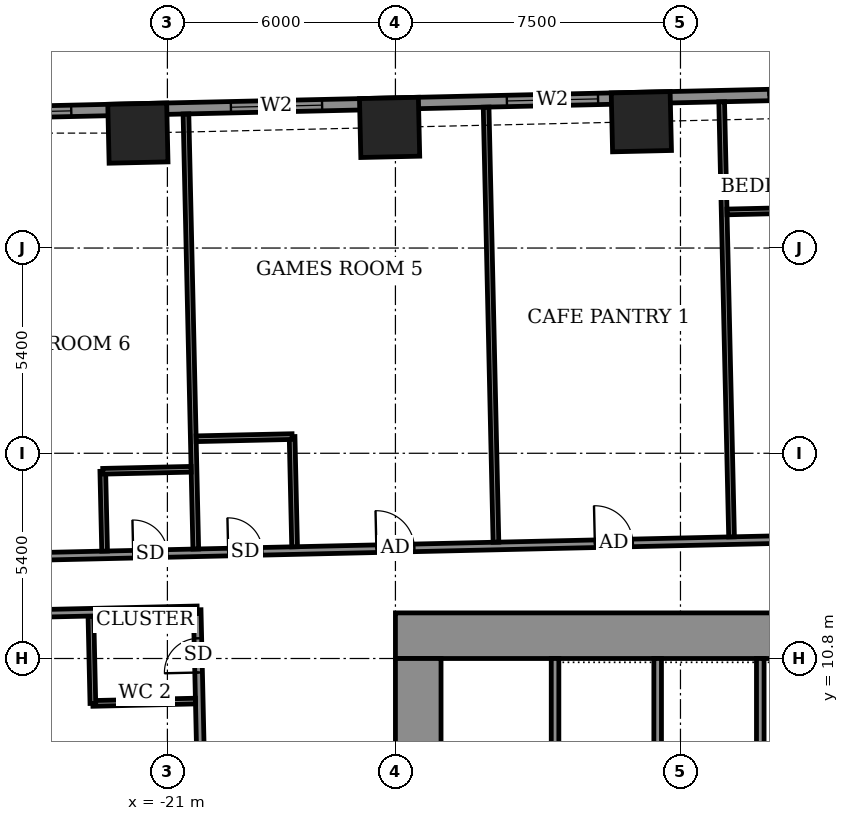
"""IFC4 building model, lengths in metres.
Left out: names, types, materials, properties, quantities, classifications, styles, units other than length and angle.
Written with IfcOpenShell. Run it as: python <this file> out.ifc"""

import sys

from ifc_helpers import new_model, si_unit, direction, frame, frame_2d, origin, origin_2d, place, context, subcontext, project, spatial, rectangle, extrude, element, fill, save


model = new_model("IFC4")
c1 = context("Model", 3, precision=1e-05, world=origin(), true_north=direction((0.0, 1.0)))
c2 = subcontext(c1, "Body", "Model", "MODEL_VIEW")
j1 = project(units=[si_unit("LENGTHUNIT", "METRE"), si_unit("PLANEANGLEUNIT", "RADIAN")], contexts=[c1])
p1 = place(None, origin())
s1 = spatial("IfcSite", under=j1, at=p1, CompositionType="ELEMENT")
p2 = place(p1, origin())
s2 = spatial("IfcBuilding", under=s1, at=p2, CompositionType="ELEMENT")
p3 = place(p2, frame((0.0, 0.0, 29.5)))
s3 = spatial("IfcBuildingStorey", under=s2, at=p3, CompositionType="ELEMENT", Elevation=29.5)
for number, where, z_axis, x_axis in (
    (1, (-8.529, 24.924, -0.55), (0.0, 0.0, 1.0), (-1.0, -0.023, 0.0)),
    (2, (-15.154, 24.774, -0.55), (0.0, 0.0, 1.0), (-1.0, -0.023, 0.0)),
    (3, (-21.776, 24.624, -0.55), (0.0, 0.0, 1.0), (-1.0, -0.023, 0.0)),
):
    element("IfcColumn", number, at=place(p3, frame(where, z_axis=z_axis, x_axis=x_axis)), inside=s3, PredefinedType="COLUMN", context=c2, shape_type="SweptSolid", body=[
        extrude(rectangle(XDim=1.55, YDim=1.55, at=origin_2d()), origin(), (0.0, 0.0, 1.0), 4.6),
    ])
p4 = place(p3, frame((24.423, 26.298, 0.0), z_axis=(0.0, 0.0, 1.0), x_axis=(-0.999742433108, -0.022695097355, 0.0)))
e4 = element("IfcWall", 4, at=p4, inside=s3, PredefinedType="SOLIDWALL", context=c2, shape_type="SweptSolid", body=[
    extrude(rectangle(XDim=52.701, YDim=0.3, at=frame_2d((26.35, 0.0))), origin(), (0.0, 0.0, 1.0), 4.05),
])
p5 = place(p4, frame((2.757, 0.0, 0.0)))
e5 = element("IfcOpeningElement", 5, at=p5, cuts=e4, PredefinedType="OPENING", context=c2, shape_type="SweptSolid", body=[
    extrude(rectangle(XDim=1.5, YDim=2.4, at=frame_2d((0.75, 1.2))), frame((0.0, 0.16, 0.0), z_axis=(0.0, -1.0, 0.0), x_axis=(1.0, 0.0, 0.0)), (0.0, 0.0, 1.0), 0.32),
])
p6 = place(p4, frame((8.937, 0.0, 0.9)))
e6 = element("IfcOpeningElement", 6, at=p6, cuts=e4, PredefinedType="OPENING", context=c2, shape_type="SweptSolid", body=[
    extrude(rectangle(XDim=2.4, YDim=1.5, at=frame_2d((1.2, 0.75))), frame((0.0, 0.16, 0.0), z_axis=(0.0, -1.0, 0.0), x_axis=(1.0, 0.0, 0.0)), (0.0, 0.0, 1.0), 0.32),
])
p7 = place(p4, frame((16.675, 0.0, 0.0)))
e7 = element("IfcOpeningElement", 7, at=p7, cuts=e4, PredefinedType="OPENING", context=c2, shape_type="SweptSolid", body=[
    extrude(rectangle(XDim=1.5, YDim=2.4, at=frame_2d((0.75, 1.2))), frame((0.0, 0.16, 0.0), z_axis=(0.0, -1.0, 0.0), x_axis=(1.0, 0.0, 0.0)), (0.0, 0.0, 1.0), 0.32),
])
p8 = place(p4, frame((22.5, 0.0, 0.0)))
e8 = element("IfcOpeningElement", 8, at=p8, cuts=e4, PredefinedType="OPENING", context=c2, shape_type="SweptSolid", body=[
    extrude(rectangle(XDim=1.5, YDim=2.4, at=frame_2d((0.75, 1.2))), frame((0.0, 0.16, 0.0), z_axis=(0.0, -1.0, 0.0), x_axis=(1.0, 0.0, 0.0)), (0.0, 0.0, 1.0), 0.32),
])
p9 = place(p4, frame((28.113, 0.0, 0.0)))
e9 = element("IfcOpeningElement", 9, at=p9, cuts=e4, PredefinedType="OPENING", context=c2, shape_type="SweptSolid", body=[
    extrude(rectangle(XDim=1.5, YDim=2.4, at=frame_2d((0.75, 1.2))), frame((0.0, 0.16, 0.0), z_axis=(0.0, -1.0, 0.0), x_axis=(1.0, 0.0, 0.0)), (0.0, 0.0, 1.0), 0.32),
])
p10 = place(p4, frame((34.1, 0.0, 0.9)))
e10 = element("IfcOpeningElement", 10, at=p10, cuts=e4, PredefinedType="OPENING", context=c2, shape_type="SweptSolid", body=[
    extrude(rectangle(XDim=2.4, YDim=1.5, at=frame_2d((1.2, 0.75))), frame((0.0, 0.16, 0.0), z_axis=(0.0, -1.0, 0.0), x_axis=(1.0, 0.0, 0.0)), (0.0, 0.0, 1.0), 0.32),
])
p11 = place(p4, frame((41.363, 0.0, 0.9)))
e11 = element("IfcOpeningElement", 11, at=p11, cuts=e4, PredefinedType="OPENING", context=c2, shape_type="SweptSolid", body=[
    extrude(rectangle(XDim=2.4, YDim=1.5, at=frame_2d((1.2, 0.75))), frame((0.0, 0.16, 0.0), z_axis=(0.0, -1.0, 0.0), x_axis=(1.0, 0.0, 0.0)), (0.0, 0.0, 1.0), 0.32),
])
p12 = place(p4, frame((47.965, 0.0, 0.9)))
e12 = element("IfcOpeningElement", 12, at=p12, cuts=e4, PredefinedType="OPENING", context=c2, shape_type="SweptSolid", body=[
    extrude(rectangle(XDim=2.4, YDim=1.5, at=frame_2d((1.2, 0.75))), frame((0.0, 0.16, 0.0), z_axis=(0.0, -1.0, 0.0), x_axis=(1.0, 0.0, 0.0)), (0.0, 0.0, 1.0), 0.32),
])
p13 = place(p3, frame((-17.249, 26.802, 0.0), z_axis=(0.0, 0.0, 1.0), x_axis=(0.999743094499, 0.022665943652, 0.0)))
e13 = element("IfcWall", 13, at=p13, inside=s3, PredefinedType="USERDEFINED", context=c2, shape_type="SweptSolid", body=[
    extrude(rectangle(XDim=6.0, YDim=0.55, at=frame_2d((3.0, 0.0))), origin(), (0.0, 0.0, 1.0), 0.8),
])
p14 = place(p3, frame((-19.589, -15.562, 0.0), z_axis=(0.0, 0.0, 1.0), x_axis=(-0.02267447203, 0.999742901109, 0.0)))
e14 = element("IfcWall", 14, at=p14, inside=s3, PredefinedType="PARTITIONING", context=c2, shape_type="SweptSolid", body=[
    extrude(rectangle(XDim=27.65, YDim=0.2, at=frame_2d((13.825, 0.0))), origin(), (0.0, 0.0, 1.0), 4.05),
])
p15 = place(p14, frame((22.313, 0.0, 0.0)))
e15 = element("IfcOpeningElement", 15, at=p15, cuts=e14, PredefinedType="OPENING", context=c2, shape_type="SweptSolid", body=[
    extrude(rectangle(XDim=1.0, YDim=2.1, at=frame_2d((0.5, 1.05))), frame((0.0, 0.11, 0.0), z_axis=(0.0, -1.0, 0.0), x_axis=(1.0, 0.0, 0.0)), (0.0, 0.0, 1.0), 0.22),
])
p16 = place(p14, frame((26.0, 0.0, 0.0)))
e16 = element("IfcOpeningElement", 16, at=p16, cuts=e14, PredefinedType="OPENING", context=c2, shape_type="SweptSolid", body=[
    extrude(rectangle(XDim=0.9, YDim=2.1, at=frame_2d((0.45, 1.05))), frame((0.0, 0.11, 0.0), z_axis=(0.0, -1.0, 0.0), x_axis=(1.0, 0.0, 0.0)), (0.0, 0.0, 1.0), 0.22),
])
p17 = place(p14, frame((17.817, 0.0, 0.0)))
e17 = element("IfcOpeningElement", 17, at=p17, cuts=e14, PredefinedType="OPENING", context=c2, shape_type="SweptSolid", body=[
    extrude(rectangle(XDim=1.0, YDim=2.1, at=frame_2d((0.5, 1.05))), frame((0.0, 0.11, 0.0), z_axis=(0.0, -1.0, 0.0), x_axis=(1.0, 0.0, 0.0)), (0.0, 0.0, 1.0), 0.22),
])
p18 = place(p14, frame((12.1, 0.0, 0.0)))
e18 = element("IfcOpeningElement", 18, at=p18, cuts=e14, PredefinedType="OPENING", context=c2, shape_type="SweptSolid", body=[
    extrude(rectangle(XDim=1.0, YDim=2.1, at=frame_2d((0.5, 1.05))), frame((0.0, 0.11, 0.0), z_axis=(0.0, -1.0, 0.0), x_axis=(1.0, 0.0, 0.0)), (0.0, 0.0, 1.0), 0.22),
])
p19 = place(p14, frame((14.625, 0.0, 0.0)))
e19 = element("IfcOpeningElement", 19, at=p19, cuts=e14, PredefinedType="OPENING", context=c2, shape_type="SweptSolid", body=[
    extrude(rectangle(XDim=0.9, YDim=2.1, at=frame_2d((0.45, 1.05))), frame((0.0, 0.11, 0.0), z_axis=(0.0, -1.0, 0.0), x_axis=(1.0, 0.0, 0.0)), (0.0, 0.0, 1.0), 0.22),
])
p20 = place(p14, frame((9.825, 0.0, 0.0)))
e20 = element("IfcOpeningElement", 20, at=p20, cuts=e14, PredefinedType="OPENING", context=c2, shape_type="SweptSolid", body=[
    extrude(rectangle(XDim=1.0, YDim=2.1, at=frame_2d((0.5, 1.05))), frame((0.0, 0.11, 0.0), z_axis=(0.0, -1.0, 0.0), x_axis=(1.0, 0.0, 0.0)), (0.0, 0.0, 1.0), 0.22),
])
p21 = place(p14, frame((7.475, 0.0, 0.0)))
e21 = element("IfcOpeningElement", 21, at=p21, cuts=e14, PredefinedType="OPENING", context=c2, shape_type="SweptSolid", body=[
    extrude(rectangle(XDim=0.9, YDim=2.1, at=frame_2d((0.45, 1.05))), frame((0.0, 0.11, 0.0), z_axis=(0.0, -1.0, 0.0), x_axis=(1.0, 0.0, 0.0)), (0.0, 0.0, 1.0), 0.22),
])
p22 = place(p14, frame((1.612, 0.0, 0.0)))
e22 = element("IfcOpeningElement", 22, at=p22, cuts=e14, PredefinedType="OPENING", context=c2, shape_type="SweptSolid", body=[
    extrude(rectangle(XDim=1.0, YDim=2.1, at=frame_2d((0.5, 1.05))), frame((0.0, 0.11, 0.0), z_axis=(0.0, -1.0, 0.0), x_axis=(1.0, 0.0, 0.0)), (0.0, 0.0, 1.0), 0.22),
])
p23 = place(p14, frame((4.975, 0.0, 0.0)))
e23 = element("IfcOpeningElement", 23, at=p23, cuts=e14, PredefinedType="OPENING", context=c2, shape_type="SweptSolid", body=[
    extrude(rectangle(XDim=0.9, YDim=2.1, at=frame_2d((0.45, 1.05))), frame((0.0, 0.11, 0.0), z_axis=(0.0, -1.0, 0.0), x_axis=(1.0, 0.0, 0.0)), (0.0, 0.0, 1.0), 0.22),
])
p24 = place(p3, frame((-22.961, 9.618, 0.0), z_axis=(0.0, 0.0, 1.0), x_axis=(0.999736155505, 0.022969966847, 0.0)))
e24 = element("IfcWall", 24, at=p24, inside=s3, PredefinedType="PARTITIONING", context=c2, shape_type="SweptSolid", body=[
    extrude(rectangle(XDim=2.7, YDim=0.15, at=frame_2d((1.35, 0.0))), origin(), (0.0, 0.0, 1.0), 4.05),
])
p25 = place(p3, frame((-22.961, 9.618, 0.0), z_axis=(0.0, 0.0, 1.0), x_axis=(-0.022603288534, 0.999744513037, 0.0)))
e25 = element("IfcWall", 25, at=p25, inside=s3, PredefinedType="PARTITIONING", context=c2, shape_type="SweptSolid", body=[
    extrude(rectangle(XDim=2.301, YDim=0.15, at=frame_2d((1.15, 0.0))), origin(), (0.0, 0.0, 1.0), 4.05),
])
p26 = place(p3, frame((-31.313, 11.829, 0.0), z_axis=(0.0, 0.0, 1.0), x_axis=(0.999742346277, 0.022698921993, 0.0)))
e26 = element("IfcWall", 26, at=p26, inside=s3, PredefinedType="PARTITIONING", context=c2, shape_type="SweptSolid", body=[
    extrude(rectangle(XDim=11.1, YDim=0.2, at=frame_2d((5.55, 0.0))), origin(), (0.0, 0.0, 1.0), 4.05),
])
p27 = place(p3, frame((-31.347, 13.329, 0.0), z_axis=(0.0, 0.0, 1.0), x_axis=(0.999742613079, 0.022687168058, 0.0)))
e27 = element("IfcWall", 27, at=p27, inside=s3, PredefinedType="PARTITIONING", context=c2, shape_type="SweptSolid", body=[
    extrude(rectangle(XDim=58.799, YDim=0.2, at=frame_2d((29.399, 0.0))), origin(), (0.0, 0.0, 1.0), 4.05),
])
p28 = place(p27, frame((55.05, 0.0, 0.0)))
e28 = element("IfcOpeningElement", 28, at=p28, cuts=e27, PredefinedType="OPENING", context=c2, shape_type="SweptSolid", body=[
    extrude(rectangle(XDim=1.0, YDim=2.1, at=frame_2d((0.5, 1.05))), frame((0.0, 0.11, 0.0), z_axis=(0.0, -1.0, 0.0), x_axis=(1.0, 0.0, 0.0)), (0.0, 0.0, 1.0), 0.22),
])
p29 = place(p27, frame((49.15, 0.0, 0.0)))
e29 = element("IfcOpeningElement", 29, at=p29, cuts=e27, PredefinedType="OPENING", context=c2, shape_type="SweptSolid", body=[
    extrude(rectangle(XDim=0.9, YDim=2.1, at=frame_2d((0.45, 1.05))), frame((0.0, 0.11, 0.0), z_axis=(0.0, -1.0, 0.0), x_axis=(1.0, 0.0, 0.0)), (0.0, 0.0, 1.0), 0.22),
])
p30 = place(p27, frame((42.55, 0.0, 0.0)))
e30 = element("IfcOpeningElement", 30, at=p30, cuts=e27, PredefinedType="OPENING", context=c2, shape_type="SweptSolid", body=[
    extrude(rectangle(XDim=1.0, YDim=2.1, at=frame_2d((0.5, 1.05))), frame((0.0, 0.11, 0.0), z_axis=(0.0, -1.0, 0.0), x_axis=(1.0, 0.0, 0.0)), (0.0, 0.0, 1.0), 0.22),
])
p31 = place(p27, frame((46.55, 0.0, 0.0)))
e31 = element("IfcOpeningElement", 31, at=p31, cuts=e27, PredefinedType="OPENING", context=c2, shape_type="SweptSolid", body=[
    extrude(rectangle(XDim=0.9, YDim=2.1, at=frame_2d((0.45, 1.05))), frame((0.0, 0.11, 0.0), z_axis=(0.0, -1.0, 0.0), x_axis=(1.0, 0.0, 0.0)), (0.0, 0.0, 1.0), 0.22),
])
p32 = place(p27, frame((38.625, 0.0, 0.0)))
e32 = element("IfcOpeningElement", 32, at=p32, cuts=e27, PredefinedType="OPENING", context=c2, shape_type="SweptSolid", body=[
    extrude(rectangle(XDim=0.9, YDim=2.1, at=frame_2d((0.45, 1.05))), frame((0.0, 0.11, 0.0), z_axis=(0.0, -1.0, 0.0), x_axis=(1.0, 0.0, 0.0)), (0.0, 0.0, 1.0), 0.22),
])
p33 = place(p27, frame((31.15, 0.0, 0.0)))
e33 = element("IfcOpeningElement", 33, at=p33, cuts=e27, PredefinedType="OPENING", context=c2, shape_type="SweptSolid", body=[
    extrude(rectangle(XDim=0.9, YDim=2.1, at=frame_2d((0.45, 1.05))), frame((0.0, 0.11, 0.0), z_axis=(0.0, -1.0, 0.0), x_axis=(1.0, 0.0, 0.0)), (0.0, 0.0, 1.0), 0.22),
])
p34 = place(p27, frame((28.475, 0.0, 0.0)))
e34 = element("IfcOpeningElement", 34, at=p34, cuts=e27, PredefinedType="OPENING", context=c2, shape_type="SweptSolid", body=[
    extrude(rectangle(XDim=0.9, YDim=2.1, at=frame_2d((0.45, 1.05))), frame((0.0, 0.11, 0.0), z_axis=(0.0, -1.0, 0.0), x_axis=(1.0, 0.0, 0.0)), (0.0, 0.0, 1.0), 0.22),
])
p35 = place(p27, frame((21.6, 0.0, 0.0)))
e35 = element("IfcOpeningElement", 35, at=p35, cuts=e27, PredefinedType="OPENING", context=c2, shape_type="SweptSolid", body=[
    extrude(rectangle(XDim=1.0, YDim=2.1, at=frame_2d((0.5, 1.05))), frame((0.0, 0.11, 0.0), z_axis=(0.0, -1.0, 0.0), x_axis=(1.0, 0.0, 0.0)), (0.0, 0.0, 1.0), 0.22),
])
p36 = place(p27, frame((15.85, 0.0, 0.0)))
e36 = element("IfcOpeningElement", 36, at=p36, cuts=e27, PredefinedType="OPENING", context=c2, shape_type="SweptSolid", body=[
    extrude(rectangle(XDim=1.0, YDim=2.1, at=frame_2d((0.5, 1.05))), frame((0.0, 0.11, 0.0), z_axis=(0.0, -1.0, 0.0), x_axis=(1.0, 0.0, 0.0)), (0.0, 0.0, 1.0), 0.22),
])
p37 = place(p27, frame((11.95, 0.0, 0.0)))
e37 = element("IfcOpeningElement", 37, at=p37, cuts=e27, PredefinedType="OPENING", context=c2, shape_type="SweptSolid", body=[
    extrude(rectangle(XDim=0.9, YDim=2.1, at=frame_2d((0.45, 1.05))), frame((0.0, 0.11, 0.0), z_axis=(0.0, -1.0, 0.0), x_axis=(1.0, 0.0, 0.0)), (0.0, 0.0, 1.0), 0.22),
])
p38 = place(p27, frame((3.15, 0.0, 0.0)))
e38 = element("IfcOpeningElement", 38, at=p38, cuts=e27, PredefinedType="OPENING", context=c2, shape_type="SweptSolid", body=[
    extrude(rectangle(XDim=1.0, YDim=2.1, at=frame_2d((0.5, 1.05))), frame((0.0, 0.11, 0.0), z_axis=(0.0, -1.0, 0.0), x_axis=(1.0, 0.0, 0.0)), (0.0, 0.0, 1.0), 0.22),
])
p39 = place(p27, frame((9.45, 0.0, 0.0)))
e39 = element("IfcOpeningElement", 39, at=p39, cuts=e27, PredefinedType="OPENING", context=c2, shape_type="SweptSolid", body=[
    extrude(rectangle(XDim=0.9, YDim=2.1, at=frame_2d((0.45, 1.05))), frame((0.0, 0.11, 0.0), z_axis=(0.0, -1.0, 0.0), x_axis=(1.0, 0.0, 0.0)), (0.0, 0.0, 1.0), 0.22),
])
p40 = place(p3, frame((-22.652, 13.626, 0.0), z_axis=(0.0, 0.0, 1.0), x_axis=(-0.022779486249, 0.999740513837, 0.0)))
e40 = element("IfcWall", 40, at=p40, inside=s3, PredefinedType="PARTITIONING", context=c2, shape_type="SweptSolid", body=[
    extrude(rectangle(XDim=2.101, YDim=0.15, at=frame_2d((1.05, 0.0))), origin(), (0.0, 0.0, 1.0), 4.05),
])
p41 = place(p3, frame((-20.253, 13.681, 0.0), z_axis=(0.0, 0.0, 1.0), x_axis=(-0.022623082162, 0.999744065325, 0.0)))
e41 = element("IfcWall", 41, at=p41, inside=s3, PredefinedType="PARTITIONING", context=c2, shape_type="SweptSolid", body=[
    extrude(rectangle(XDim=11.45, YDim=0.15, at=frame_2d((5.725, 0.0))), origin(), (0.0, 0.0, 1.0), 3.55),
])
p42 = place(p3, frame((-17.653, 13.74, 0.0), z_axis=(0.0, 0.0, 1.0), x_axis=(-0.022732880677, 0.999741574676, 0.0)))
e42 = element("IfcWall", 42, at=p42, inside=s3, PredefinedType="PARTITIONING", context=c2, shape_type="SweptSolid", body=[
    extrude(rectangle(XDim=2.9, YDim=0.15, at=frame_2d((1.45, 0.0))), origin(), (0.0, 0.0, 1.0), 4.05),
])
p43 = place(p3, frame((-12.355, 13.86, 0.0), z_axis=(0.0, 0.0, 1.0), x_axis=(-0.022623564427, 0.999744054412, 0.0)))
e43 = element("IfcWall", 43, at=p43, inside=s3, PredefinedType="PARTITIONING", context=c2, shape_type="SweptSolid", body=[
    extrude(rectangle(XDim=11.45, YDim=0.15, at=frame_2d((5.725, 0.0))), origin(), (0.0, 0.0, 1.0), 3.55),
])
p44 = place(p3, frame((-6.156, 14.001, 0.0), z_axis=(0.0, 0.0, 1.0), x_axis=(-0.022708327922, 0.999742132674, 0.0)))
e44 = element("IfcWall", 44, at=p44, inside=s3, PredefinedType="PARTITIONING", context=c2, shape_type="SweptSolid", body=[
    extrude(rectangle(XDim=11.45, YDim=0.15, at=frame_2d((5.725, 0.0))), origin(), (0.0, 0.0, 1.0), 3.55),
])
p45 = place(p3, frame((-22.7, 15.726, 0.0), z_axis=(0.0, 0.0, 1.0), x_axis=(0.999740478815, 0.022781023197, 0.0)))
e45 = element("IfcWall", 45, at=p45, inside=s3, PredefinedType="PARTITIONING", context=c2, shape_type="SweptSolid", body=[
    extrude(rectangle(XDim=2.325, YDim=0.15, at=frame_2d((1.163, 0.0))), origin(), (0.0, 0.0, 1.0), 4.05),
])
p46 = place(p3, frame((-20.243, 16.582, 0.0), z_axis=(0.0, 0.0, 1.0), x_axis=(0.9997461113, 0.022532486354, 0.0)))
e46 = element("IfcWall", 46, at=p46, inside=s3, PredefinedType="PARTITIONING", context=c2, shape_type="SweptSolid", body=[
    extrude(rectangle(XDim=2.525, YDim=0.15, at=frame_2d((1.262, 0.0))), origin(), (0.0, 0.0, 1.0), 4.05),
])
p47 = place(p3, frame((-6.275, 22.55, 0.0), z_axis=(0.0, 0.0, 1.0), x_axis=(0.999740260747, 0.02279059109, 0.0)))
e47 = element("IfcWall", 47, at=p47, inside=s3, PredefinedType="PARTITIONING", context=c2, shape_type="SweptSolid", body=[
    extrude(rectangle(XDim=2.324, YDim=0.15, at=frame_2d((1.162, 0.0))), origin(), (0.0, 0.0, 1.0), 4.05),
])
p48 = place(p3, frame((-15.0, 11.4, 0.0), z_axis=(0.0, 0.0, 1.0), x_axis=(1.0, 0.0, 0.0)))
e48 = element("IfcWall", 48, at=p48, inside=s3, PredefinedType="SHEAR", context=c2, shape_type="SweptSolid", body=[
    extrude(rectangle(XDim=30.0, YDim=1.2, at=frame_2d((15.0, 0.0))), origin(), (0.0, 0.0, 1.0), 4.6),
])
p49 = place(p3, frame((-14.4, -10.8, 0.0), z_axis=(0.0, 0.0, 1.0), x_axis=(0.0, 1.0, 0.0)))
e49 = element("IfcWall", 49, at=p49, inside=s3, PredefinedType="SHEAR", context=c2, shape_type="SweptSolid", body=[
    extrude(rectangle(XDim=21.6, YDim=1.2, at=frame_2d((10.8, 0.0))), origin(), (0.0, 0.0, 1.0), 4.6),
])
p50 = place(p49, frame((8.25, 0.0, 0.0)))
e50 = element("IfcOpeningElement", 50, at=p50, cuts=e49, PredefinedType="OPENING", context=c2, shape_type="SweptSolid", body=[
    extrude(rectangle(XDim=1.2, YDim=2.1, at=frame_2d((0.6, 1.05))), frame((0.0, 0.61, 0.0), z_axis=(0.0, -1.0, 0.0), x_axis=(1.0, 0.0, 0.0)), (0.0, 0.0, 1.0), 1.22),
])
p51 = place(p49, frame((15.25, 0.0, 0.0)))
e51 = element("IfcOpeningElement", 51, at=p51, cuts=e49, PredefinedType="OPENING", context=c2, shape_type="SweptSolid", body=[
    extrude(rectangle(XDim=1.2, YDim=2.1, at=frame_2d((0.6, 1.05))), frame((0.0, 0.61, 0.0), z_axis=(0.0, -1.0, 0.0), x_axis=(1.0, 0.0, 0.0)), (0.0, 0.0, 1.0), 1.22),
])
for number, where, z_axis, x_axis in (
    (52, (-10.8, 8.2, 0.0), (0.0, 0.0, 1.0), (0.0, 1.0, 0.0)),
    (53, (-8.1, 8.2, 0.0), (0.0, 0.0, 1.0), (0.0, 1.0, 0.0)),
    (54, (-5.4, 8.2, 0.0), (0.0, 0.0, 1.0), (0.0, 1.0, 0.0)),
):
    element("IfcWall", number, at=place(p3, frame(where, z_axis=z_axis, x_axis=x_axis)), inside=s3, PredefinedType="SHEAR", context=c2, shape_type="SweptSolid", body=[
        extrude(rectangle(XDim=2.6, YDim=0.2, at=frame_2d((1.3, 0.0))), origin(), (0.0, 0.0, 1.0), 4.05),
    ])
p52 = place(p9, origin())
e55 = element("IfcDoor", 55, at=p52, inside=s3, OperationType="SLIDING_TO_LEFT", PredefinedType="DOOR", context=c2, shape_type="SweptSolid", body=[
    extrude(rectangle(XDim=1.5, YDim=2.4, at=frame_2d((0.75, 1.2))), frame((0.0, 0.025, 0.0), z_axis=(0.0, -1.0, 0.0), x_axis=(1.0, 0.0, 0.0)), (0.0, 0.0, 1.0), 0.05),
])
fill(e9, e55)
p53 = place(p10, origin())
e56 = element("IfcWindow", 56, at=p53, inside=s3, PartitioningType="DOUBLE_PANEL_VERTICAL", PredefinedType="WINDOW", context=c2, shape_type="SweptSolid", body=[
    extrude(rectangle(XDim=2.4, YDim=1.5, at=frame_2d((1.2, 0.75))), frame((0.0, 0.03, 0.0), z_axis=(0.0, -1.0, 0.0), x_axis=(1.0, 0.0, 0.0)), (0.0, 0.0, 1.0), 0.06),
])
fill(e10, e56)
p54 = place(p11, origin())
e57 = element("IfcWindow", 57, at=p54, inside=s3, PartitioningType="DOUBLE_PANEL_VERTICAL", PredefinedType="WINDOW", context=c2, shape_type="SweptSolid", body=[
    extrude(rectangle(XDim=2.4, YDim=1.5, at=frame_2d((1.2, 0.75))), frame((0.0, 0.03, 0.0), z_axis=(0.0, -1.0, 0.0), x_axis=(1.0, 0.0, 0.0)), (0.0, 0.0, 1.0), 0.06),
])
fill(e11, e57)
p55 = place(p12, origin())
e58 = element("IfcWindow", 58, at=p55, inside=s3, PartitioningType="DOUBLE_PANEL_VERTICAL", PredefinedType="WINDOW", context=c2, shape_type="SweptSolid", body=[
    extrude(rectangle(XDim=2.4, YDim=1.5, at=frame_2d((1.2, 0.75))), frame((0.0, 0.03, 0.0), z_axis=(0.0, -1.0, 0.0), x_axis=(1.0, 0.0, 0.0)), (0.0, 0.0, 1.0), 0.06),
])
fill(e12, e58)
p56 = place(p35, origin())
e59 = element("IfcDoor", 59, at=p56, inside=s3, OperationType="SINGLE_SWING_RIGHT", PredefinedType="DOOR", context=c2, shape_type="SweptSolid", body=[
    extrude(rectangle(XDim=1.0, YDim=2.1, at=frame_2d((0.5, 1.05))), frame((0.0, 0.025, 0.0), z_axis=(0.0, -1.0, 0.0), x_axis=(1.0, 0.0, 0.0)), (0.0, 0.0, 1.0), 0.05),
])
fill(e35, e59)
p57 = place(p36, origin())
e60 = element("IfcDoor", 60, at=p57, inside=s3, OperationType="SINGLE_SWING_LEFT", PredefinedType="DOOR", context=c2, shape_type="SweptSolid", body=[
    extrude(rectangle(XDim=1.0, YDim=2.1, at=frame_2d((0.5, 1.05))), frame((0.0, 0.025, 0.0), z_axis=(0.0, -1.0, 0.0), x_axis=(1.0, 0.0, 0.0)), (0.0, 0.0, 1.0), 0.05),
])
fill(e36, e60)
p58 = place(p37, origin())
e61 = element("IfcDoor", 61, at=p58, inside=s3, OperationType="SINGLE_SWING_LEFT", PredefinedType="DOOR", context=c2, shape_type="SweptSolid", body=[
    extrude(rectangle(XDim=0.9, YDim=2.1, at=frame_2d((0.45, 1.05))), frame((0.0, 0.025, 0.0), z_axis=(0.0, -1.0, 0.0), x_axis=(1.0, 0.0, 0.0)), (0.0, 0.0, 1.0), 0.05),
])
fill(e37, e61)
p59 = place(p39, origin())
e62 = element("IfcDoor", 62, at=p59, inside=s3, OperationType="SINGLE_SWING_RIGHT", PredefinedType="DOOR", context=c2, shape_type="SweptSolid", body=[
    extrude(rectangle(XDim=0.9, YDim=2.1, at=frame_2d((0.45, 1.05))), frame((0.0, 0.025, 0.0), z_axis=(0.0, -1.0, 0.0), x_axis=(1.0, 0.0, 0.0)), (0.0, 0.0, 1.0), 0.05),
])
fill(e39, e62)
p60 = place(p16, origin())
e63 = element("IfcDoor", 63, at=p60, inside=s3, OperationType="SINGLE_SWING_LEFT", PredefinedType="DOOR", context=c2, shape_type="SweptSolid", body=[
    extrude(rectangle(XDim=0.9, YDim=2.1, at=frame_2d((0.45, 1.05))), frame((0.0, 0.025, 0.0), z_axis=(0.0, -1.0, 0.0), x_axis=(1.0, 0.0, 0.0)), (0.0, 0.0, 1.0), 0.05),
])
fill(e16, e63)
save(model, sys.argv[1])
